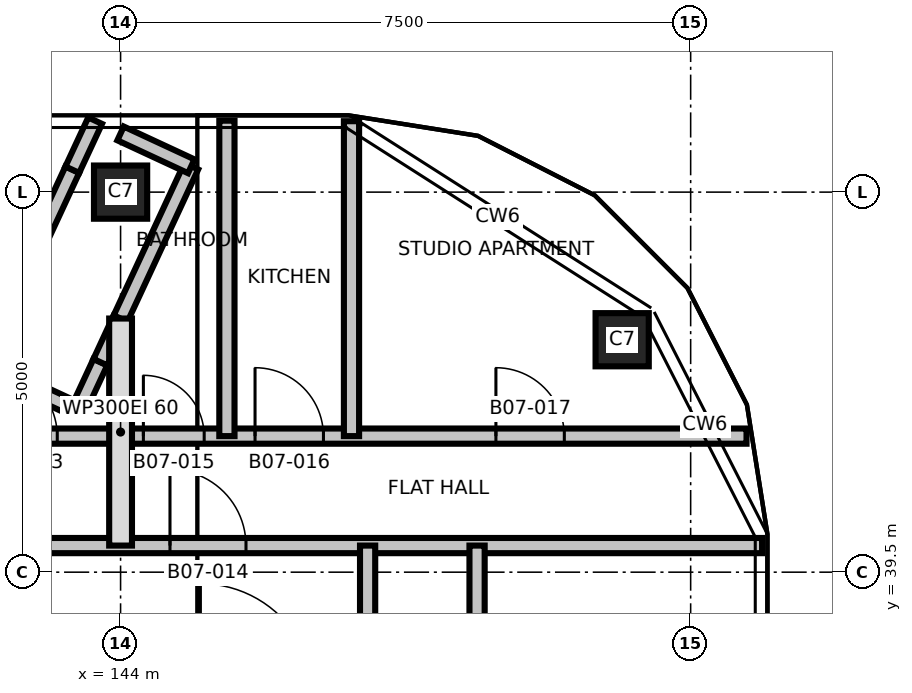
"""IFC4 building model, lengths in metres.
Left out: names, types, materials, properties, quantities, classifications, styles, units other than length and angle.
Written with IfcOpenShell. Run it as: python <this file> out.ifc"""

import sys

from ifc_helpers import new_model, si_unit, direction, frame, frame_2d, origin, origin_2d, place, context, subcontext, project, spatial, rectangle, extrude, element, fill, save


model = new_model("IFC4")
c1 = context("Model", 3, precision=1e-05, world=origin(), true_north=direction((0.0, 1.0)))
c2 = subcontext(c1, "Body", "Model", "MODEL_VIEW")
j1 = project(units=[si_unit("LENGTHUNIT", "METRE"), si_unit("PLANEANGLEUNIT", "RADIAN")], contexts=[c1])
p1 = place(None, origin())
s1 = spatial("IfcSite", under=j1, at=p1, CompositionType="ELEMENT")
p2 = place(p1, origin())
s2 = spatial("IfcBuilding", under=s1, at=p2, CompositionType="ELEMENT")
p3 = place(p2, frame((0.0, 0.0, 90.8)))
s3 = spatial("IfcBuildingStorey", under=s2, at=p3, CompositionType="ELEMENT", Elevation=90.8)
for number, where, z_axis, x_axis in (
    (1, (150.599, 42.558, 0.0), (0.0, 0.0, 1.0), (1.0, 0.0, 0.0)),
    (2, (144.0, 44.5, 0.0), (0.0, 0.0, 1.0), (1.0, 0.0, 0.0)),
):
    element("IfcColumn", number, at=place(p3, frame(where, z_axis=z_axis, x_axis=x_axis)), inside=s3, PredefinedType="COLUMN", context=c2, shape_type="SweptSolid", body=[
        extrude(rectangle(XDim=0.7, YDim=0.7, at=origin_2d()), origin(), (0.0, 0.0, 1.0), 3.7),
    ])
p4 = place(p3, frame((142.169, 42.218, 0.0), z_axis=(0.0, 0.0, 1.0), x_axis=(0.906890025327, -0.421367395466, 0.0)))
e3 = element("IfcWall", 3, at=p4, inside=s3, PredefinedType="PARTITIONING", context=c2, shape_type="SweptSolid", body=[
    extrude(rectangle(XDim=1.4, YDim=0.2, at=frame_2d((0.7, 0.0))), origin(), (0.0, 0.0, 1.0), 3.4),
])
p5 = place(p3, frame((142.169, 42.218, 0.0), z_axis=(0.0, 0.0, 1.0), x_axis=(0.421002733132, 0.907059368893, 0.0)))
e4 = element("IfcWall", 4, at=p5, inside=s3, PredefinedType="PARTITIONING", context=c2, shape_type="SweptSolid", body=[
    extrude(rectangle(XDim=2.841, YDim=0.2, at=frame_2d((1.42, 0.0))), origin(), (0.0, 0.0, 1.0), 3.4),
])
p6 = place(p3, frame((143.439, 41.628, 0.0), z_axis=(0.0, 0.0, 1.0), x_axis=(0.421223998033, 0.906956638148, 0.0)))
e5 = element("IfcWall", 5, at=p6, inside=s3, PredefinedType="PARTITIONING", context=c2, shape_type="SweptSolid", body=[
    extrude(rectangle(XDim=0.7, YDim=0.2, at=frame_2d((0.35, 0.0))), origin(), (0.0, 0.0, 1.0), 3.4),
])
p7 = place(p3, frame((143.365, 44.795, 0.0), z_axis=(0.0, 0.0, 1.0), x_axis=(0.421776680367, 0.90669974738, 0.0)))
e6 = element("IfcWall", 6, at=p7, inside=s3, PredefinedType="PARTITIONING", context=c2, shape_type="SweptSolid", body=[
    extrude(rectangle(XDim=0.711, YDim=0.2, at=frame_2d((0.356, 0.0))), origin(), (0.0, 0.0, 1.0), 3.4),
])
p8 = place(p3, frame((143.734, 42.263, 0.0), z_axis=(0.0, 0.0, 1.0), x_axis=(0.420623716183, 0.907235189675, 0.0)))
e7 = element("IfcWall", 7, at=p8, inside=s3, PredefinedType="PARTITIONING", context=c2, shape_type="SweptSolid", body=[
    extrude(rectangle(XDim=0.633, YDim=0.2, at=frame_2d((0.316, 0.0))), origin(), (0.0, 0.0, 1.0), 3.4),
])
p9 = place(p3, frame((144.0, 42.837, 0.0), z_axis=(0.0, 0.0, 1.0), x_axis=(0.421069082826, 0.907028570382, 0.0)))
e8 = element("IfcWall", 8, at=p9, inside=s3, PredefinedType="PARTITIONING", context=c2, shape_type="SweptSolid", body=[
    extrude(rectangle(XDim=2.208, YDim=0.2, at=frame_2d((1.104, 0.0))), origin(), (0.0, 0.0, 1.0), 3.4),
])
p10 = place(p3, frame((144.0, 45.272, 0.0), z_axis=(0.0, 0.0, 1.0), x_axis=(0.906960240365, -0.42121624185, 0.0)))
e9 = element("IfcWall", 9, at=p10, inside=s3, PredefinedType="PARTITIONING", context=c2, shape_type="SweptSolid", body=[
    extrude(rectangle(XDim=1.025, YDim=0.2, at=frame_2d((0.513, 0.0))), origin(), (0.0, 0.0, 1.0), 3.4),
])
p11 = place(p3, frame((120.56, 39.85, 0.0), z_axis=(0.0, 0.0, 1.0), x_axis=(1.0, 0.0, 0.0)))
e10 = element("IfcWall", 10, at=p11, inside=s3, PredefinedType="PARTITIONING", context=c2, shape_type="SweptSolid", body=[
    extrude(rectangle(XDim=31.88, YDim=0.2, at=frame_2d((15.94, 0.0))), origin(), (0.0, 0.0, 1.0), 3.4),
])
p12 = place(p11, frame((6.79, 0.0, 0.0)))
e11 = element("IfcOpeningElement", 11, at=p12, cuts=e10, PredefinedType="OPENING", context=c2, shape_type="SweptSolid", body=[
    extrude(rectangle(XDim=1.0, YDim=2.1, at=frame_2d((0.5, 1.05))), frame((0.0, 0.11, 0.0), z_axis=(0.0, -1.0, 0.0), x_axis=(1.0, 0.0, 0.0)), (0.0, 0.0, 1.0), 0.22),
])
p13 = place(p11, frame((15.44, 0.0, 0.0)))
e12 = element("IfcOpeningElement", 12, at=p13, cuts=e10, PredefinedType="OPENING", context=c2, shape_type="SweptSolid", body=[
    extrude(rectangle(XDim=1.0, YDim=2.1, at=frame_2d((0.5, 1.05))), frame((0.0, 0.11, 0.0), z_axis=(0.0, -1.0, 0.0), x_axis=(1.0, 0.0, 0.0)), (0.0, 0.0, 1.0), 0.22),
])
p14 = place(p11, frame((24.09, 0.0, 0.0)))
e13 = element("IfcOpeningElement", 13, at=p14, cuts=e10, PredefinedType="OPENING", context=c2, shape_type="SweptSolid", body=[
    extrude(rectangle(XDim=1.0, YDim=2.1, at=frame_2d((0.5, 1.05))), frame((0.0, 0.11, 0.0), z_axis=(0.0, -1.0, 0.0), x_axis=(1.0, 0.0, 0.0)), (0.0, 0.0, 1.0), 0.22),
])
p15 = place(p3, frame((120.765, 41.29, 0.0), z_axis=(0.0, 0.0, 1.0), x_axis=(1.0, 0.0, 0.0)))
e14 = element("IfcWall", 14, at=p15, inside=s3, PredefinedType="PARTITIONING", context=c2, shape_type="SweptSolid", body=[
    extrude(rectangle(XDim=31.47, YDim=0.2, at=frame_2d((15.735, 0.0))), origin(), (0.0, 0.0, 1.0), 3.4),
])
p16 = place(p15, frame((2.397, 0.0, 0.0)))
e15 = element("IfcOpeningElement", 15, at=p16, cuts=e14, PredefinedType="OPENING", context=c2, shape_type="SweptSolid", body=[
    extrude(rectangle(XDim=0.9, YDim=2.1, at=frame_2d((0.45, 1.05))), frame((0.0, 0.11, 0.0), z_axis=(0.0, -1.0, 0.0), x_axis=(1.0, 0.0, 0.0)), (0.0, 0.0, 1.0), 0.22),
])
p17 = place(p15, frame((5.566, 0.0, 0.0)))
e16 = element("IfcOpeningElement", 16, at=p17, cuts=e14, PredefinedType="OPENING", context=c2, shape_type="SweptSolid", body=[
    extrude(rectangle(XDim=0.9, YDim=2.1, at=frame_2d((0.45, 1.05))), frame((0.0, 0.11, 0.0), z_axis=(0.0, -1.0, 0.0), x_axis=(1.0, 0.0, 0.0)), (0.0, 0.0, 1.0), 0.22),
])
p18 = place(p15, frame((7.135, 0.0, 0.0)))
e17 = element("IfcOpeningElement", 17, at=p18, cuts=e14, PredefinedType="OPENING", context=c2, shape_type="SweptSolid", body=[
    extrude(rectangle(XDim=0.8, YDim=2.1, at=frame_2d((0.4, 1.05))), frame((0.0, 0.11, 0.0), z_axis=(0.0, -1.0, 0.0), x_axis=(1.0, 0.0, 0.0)), (0.0, 0.0, 1.0), 0.22),
])
p19 = place(p15, frame((10.319, 0.0, 0.0)))
e18 = element("IfcOpeningElement", 18, at=p19, cuts=e14, PredefinedType="OPENING", context=c2, shape_type="SweptSolid", body=[
    extrude(rectangle(XDim=0.9, YDim=2.1, at=frame_2d((0.45, 1.05))), frame((0.0, 0.11, 0.0), z_axis=(0.0, -1.0, 0.0), x_axis=(1.0, 0.0, 0.0)), (0.0, 0.0, 1.0), 0.22),
])
p20 = place(p15, frame((14.119, 0.0, 0.0)))
e19 = element("IfcOpeningElement", 19, at=p20, cuts=e14, PredefinedType="OPENING", context=c2, shape_type="SweptSolid", body=[
    extrude(rectangle(XDim=0.8, YDim=2.1, at=frame_2d((0.4, 1.05))), frame((0.0, 0.11, 0.0), z_axis=(0.0, -1.0, 0.0), x_axis=(1.0, 0.0, 0.0)), (0.0, 0.0, 1.0), 0.22),
])
p21 = place(p15, frame((17.752, 0.0, 0.0)))
e20 = element("IfcOpeningElement", 20, at=p21, cuts=e14, PredefinedType="OPENING", context=c2, shape_type="SweptSolid", body=[
    extrude(rectangle(XDim=0.9, YDim=2.1, at=frame_2d((0.45, 1.05))), frame((0.0, 0.11, 0.0), z_axis=(0.0, -1.0, 0.0), x_axis=(1.0, 0.0, 0.0)), (0.0, 0.0, 1.0), 0.22),
])
p22 = place(p15, frame((21.502, 0.0, 0.0)))
e21 = element("IfcOpeningElement", 21, at=p22, cuts=e14, PredefinedType="OPENING", context=c2, shape_type="SweptSolid", body=[
    extrude(rectangle(XDim=0.9, YDim=2.1, at=frame_2d((0.45, 1.05))), frame((0.0, 0.11, 0.0), z_axis=(0.0, -1.0, 0.0), x_axis=(1.0, 0.0, 0.0)), (0.0, 0.0, 1.0), 0.22),
])
p23 = place(p15, frame((23.535, 0.0, 0.0)))
e22 = element("IfcOpeningElement", 22, at=p23, cuts=e14, PredefinedType="OPENING", context=c2, shape_type="SweptSolid", body=[
    extrude(rectangle(XDim=0.8, YDim=2.1, at=frame_2d((0.4, 1.05))), frame((0.0, 0.11, 0.0), z_axis=(0.0, -1.0, 0.0), x_axis=(1.0, 0.0, 0.0)), (0.0, 0.0, 1.0), 0.22),
])
p24 = place(p15, frame((25.004, 0.0, 0.0)))
e23 = element("IfcOpeningElement", 23, at=p24, cuts=e14, PredefinedType="OPENING", context=c2, shape_type="SweptSolid", body=[
    extrude(rectangle(XDim=0.9, YDim=2.1, at=frame_2d((0.45, 1.05))), frame((0.0, 0.11, 0.0), z_axis=(0.0, -1.0, 0.0), x_axis=(1.0, 0.0, 0.0)), (0.0, 0.0, 1.0), 0.22),
])
p25 = place(p15, frame((28.173, 0.0, 0.0)))
e24 = element("IfcOpeningElement", 24, at=p25, cuts=e14, PredefinedType="OPENING", context=c2, shape_type="SweptSolid", body=[
    extrude(rectangle(XDim=0.9, YDim=2.1, at=frame_2d((0.45, 1.05))), frame((0.0, 0.11, 0.0), z_axis=(0.0, -1.0, 0.0), x_axis=(1.0, 0.0, 0.0)), (0.0, 0.0, 1.0), 0.22),
])
p26 = place(p3, frame((144.0, 39.85, 0.0), z_axis=(0.0, 0.0, 1.0), x_axis=(0.0, 1.0, 0.0)))
e25 = element("IfcWall", 25, at=p26, inside=s3, PredefinedType="PARTITIONING", context=c2, shape_type="SweptSolid", body=[
    extrude(rectangle(XDim=2.987, YDim=0.3, at=frame_2d((1.493, 0.0))), origin(), (0.0, 0.0, 1.0), 3.4),
])
p27 = place(p3, frame((145.399, 41.29, 0.0), z_axis=(0.0, 0.0, 1.0), x_axis=(0.0, 1.0, 0.0)))
e26 = element("IfcWall", 26, at=p27, inside=s3, PredefinedType="PARTITIONING", context=c2, shape_type="SweptSolid", body=[
    extrude(rectangle(XDim=4.15, YDim=0.2, at=frame_2d((2.075, 0.0))), origin(), (0.0, 0.0, 1.0), 3.4),
])
p28 = place(p3, frame((147.038, 41.29, 0.0), z_axis=(0.0, 0.0, 1.0), x_axis=(0.0, 1.0, 0.0)))
e27 = element("IfcWall", 27, at=p28, inside=s3, PredefinedType="PARTITIONING", context=c2, shape_type="SweptSolid", body=[
    extrude(rectangle(XDim=4.143, YDim=0.2, at=frame_2d((2.072, 0.0))), origin(), (0.0, 0.0, 1.0), 3.4),
])
p29 = place(p3, frame((147.25, 22.15, 0.0), z_axis=(0.0, 0.0, 1.0), x_axis=(0.0, 1.0, 0.0)))
e28 = element("IfcWall", 28, at=p29, inside=s3, PredefinedType="PARTITIONING", context=c2, shape_type="SweptSolid", body=[
    extrude(rectangle(XDim=17.7, YDim=0.2, at=frame_2d((8.85, 0.0))), origin(), (0.0, 0.0, 1.0), 3.4),
])
p30 = place(p29, frame((2.65, 0.0, 0.0)))
e29 = element("IfcOpeningElement", 29, at=p30, cuts=e28, PredefinedType="OPENING", context=c2, shape_type="SweptSolid", body=[
    extrude(rectangle(XDim=1.0, YDim=2.1, at=frame_2d((0.5, 1.05))), frame((0.0, 0.11, 0.0), z_axis=(0.0, -1.0, 0.0), x_axis=(1.0, 0.0, 0.0)), (0.0, 0.0, 1.0), 0.22),
])
p31 = place(p3, frame((148.69, 22.15, 0.0), z_axis=(0.0, 0.0, 1.0), x_axis=(0.0, 1.0, 0.0)))
e30 = element("IfcWall", 30, at=p31, inside=s3, PredefinedType="PARTITIONING", context=c2, shape_type="SweptSolid", body=[
    extrude(rectangle(XDim=17.7, YDim=0.2, at=frame_2d((8.85, 0.0))), origin(), (0.0, 0.0, 1.0), 3.4),
])
p32 = place(p31, frame((1.028, 0.0, 0.0)))
e31 = element("IfcOpeningElement", 31, at=p32, cuts=e30, PredefinedType="OPENING", context=c2, shape_type="SweptSolid", body=[
    extrude(rectangle(XDim=0.9, YDim=2.1, at=frame_2d((0.45, 1.05))), frame((0.0, 0.11, 0.0), z_axis=(0.0, -1.0, 0.0), x_axis=(1.0, 0.0, 0.0)), (0.0, 0.0, 1.0), 0.22),
])
p33 = place(p31, frame((3.253, 0.0, 0.0)))
e32 = element("IfcOpeningElement", 32, at=p33, cuts=e30, PredefinedType="OPENING", context=c2, shape_type="SweptSolid", body=[
    extrude(rectangle(XDim=0.8, YDim=2.1, at=frame_2d((0.4, 1.05))), frame((0.0, 0.11, 0.0), z_axis=(0.0, -1.0, 0.0), x_axis=(1.0, 0.0, 0.0)), (0.0, 0.0, 1.0), 0.22),
])
p34 = place(p31, frame((6.867, 0.0, 0.0)))
e33 = element("IfcOpeningElement", 33, at=p34, cuts=e30, PredefinedType="OPENING", context=c2, shape_type="SweptSolid", body=[
    extrude(rectangle(XDim=0.9, YDim=2.1, at=frame_2d((0.45, 1.05))), frame((0.0, 0.11, 0.0), z_axis=(0.0, -1.0, 0.0), x_axis=(1.0, 0.0, 0.0)), (0.0, 0.0, 1.0), 0.22),
])
p35 = place(p31, frame((11.367, 0.0, 0.0)))
e34 = element("IfcOpeningElement", 34, at=p35, cuts=e30, PredefinedType="OPENING", context=c2, shape_type="SweptSolid", body=[
    extrude(rectangle(XDim=0.9, YDim=2.1, at=frame_2d((0.45, 1.05))), frame((0.0, 0.11, 0.0), z_axis=(0.0, -1.0, 0.0), x_axis=(1.0, 0.0, 0.0)), (0.0, 0.0, 1.0), 0.22),
])
p36 = place(p31, frame((15.075, 0.0, 0.0)))
e35 = element("IfcOpeningElement", 35, at=p36, cuts=e30, PredefinedType="OPENING", context=c2, shape_type="SweptSolid", body=[
    extrude(rectangle(XDim=0.9, YDim=2.1, at=frame_2d((0.45, 1.05))), frame((0.0, 0.11, 0.0), z_axis=(0.0, -1.0, 0.0), x_axis=(1.0, 0.0, 0.0)), (0.0, 0.0, 1.0), 0.22),
])
p37 = place(p22, origin())
e36 = element("IfcDoor", 36, at=p37, inside=s3, OperationType="SINGLE_SWING_LEFT", PredefinedType="DOOR", context=c2, shape_type="SweptSolid", body=[
    extrude(rectangle(XDim=0.9, YDim=2.1, at=frame_2d((0.45, 1.05))), frame((0.0, 0.025, 0.0), z_axis=(0.0, -1.0, 0.0), x_axis=(1.0, 0.0, 0.0)), (0.0, 0.0, 1.0), 0.05),
])
fill(e21, e36)
p38 = place(p14, origin())
e37 = element("IfcDoor", 37, at=p38, inside=s3, OperationType="SINGLE_SWING_RIGHT", PredefinedType="DOOR", context=c2, shape_type="SweptSolid", body=[
    extrude(rectangle(XDim=1.0, YDim=2.1, at=frame_2d((0.5, 1.05))), frame((0.0, 0.025, 0.0), z_axis=(0.0, -1.0, 0.0), x_axis=(1.0, 0.0, 0.0)), (0.0, 0.0, 1.0), 0.05),
])
fill(e13, e37)
p39 = place(p23, origin())
e38 = element("IfcDoor", 38, at=p39, inside=s3, OperationType="SINGLE_SWING_LEFT", PredefinedType="DOOR", context=c2, shape_type="SweptSolid", body=[
    extrude(rectangle(XDim=0.8, YDim=2.1, at=frame_2d((0.4, 1.05))), frame((0.0, 0.025, 0.0), z_axis=(0.0, -1.0, 0.0), x_axis=(1.0, 0.0, 0.0)), (0.0, 0.0, 1.0), 0.05),
])
fill(e22, e38)
p40 = place(p24, origin())
e39 = element("IfcDoor", 39, at=p40, inside=s3, OperationType="SINGLE_SWING_RIGHT", PredefinedType="DOOR", context=c2, shape_type="SweptSolid", body=[
    extrude(rectangle(XDim=0.9, YDim=2.1, at=frame_2d((0.45, 1.05))), frame((0.0, 0.025, 0.0), z_axis=(0.0, -1.0, 0.0), x_axis=(1.0, 0.0, 0.0)), (0.0, 0.0, 1.0), 0.05),
])
fill(e23, e39)
p41 = place(p25, origin())
e40 = element("IfcDoor", 40, at=p41, inside=s3, OperationType="SINGLE_SWING_LEFT", PredefinedType="DOOR", context=c2, shape_type="SweptSolid", body=[
    extrude(rectangle(XDim=0.9, YDim=2.1, at=frame_2d((0.45, 1.05))), frame((0.0, 0.025, 0.0), z_axis=(0.0, -1.0, 0.0), x_axis=(1.0, 0.0, 0.0)), (0.0, 0.0, 1.0), 0.05),
])
fill(e24, e40)
save(model, sys.argv[1])
